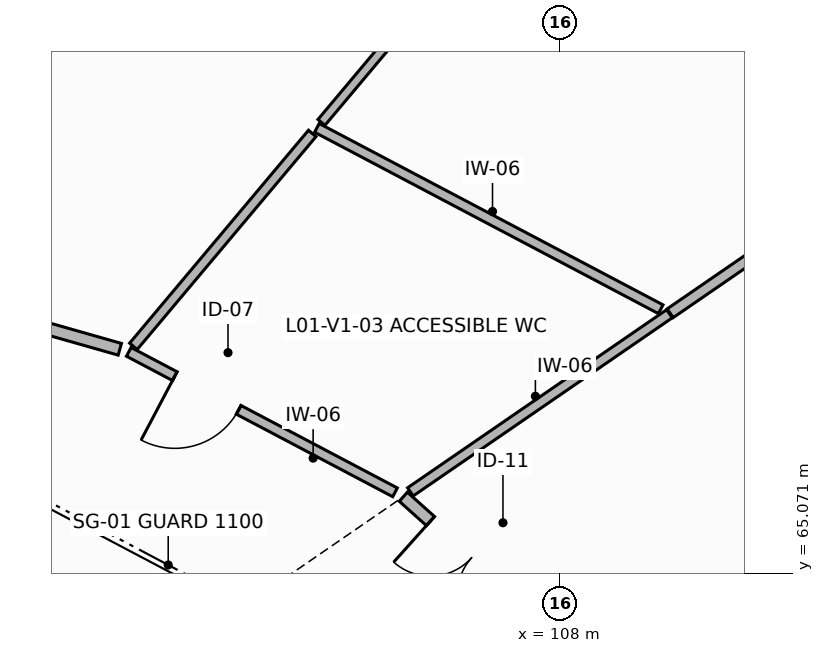
"""IFC4 building model, lengths in metres.
Left out: names, types, materials, properties, quantities, classifications, styles, units other than length and angle.
Written with IfcOpenShell. Run it as: python <this file> out.ifc"""

import sys

from ifc_helpers import new_model, si_unit, direction, frame, frame_2d, origin, place, context, subcontext, project, spatial, rectangle, extrude, element, fill, save


model = new_model("IFC4")
c1 = context("Model", 3, precision=1e-05, world=origin(), true_north=direction((0.0, 1.0)))
c2 = subcontext(c1, "Body", "Model", "MODEL_VIEW")
j1 = project(units=[si_unit("LENGTHUNIT", "METRE"), si_unit("PLANEANGLEUNIT", "RADIAN")], contexts=[c1])
p1 = place(None, origin())
s1 = spatial("IfcSite", under=j1, at=p1, CompositionType="ELEMENT")
p2 = place(p1, origin())
s2 = spatial("IfcBuilding", under=s1, at=p2, CompositionType="ELEMENT")
p3 = place(p2, frame((0.0, 0.0, 4.5)))
s3 = spatial("IfcBuildingStorey", under=s2, at=p3, CompositionType="ELEMENT", Elevation=4.5)
p4 = place(p3, frame((108.803, 63.634, 0.0), z_axis=(0.0, 0.0, 1.0), x_axis=(0.929449560743, 0.368949202513, 0.0)))
e1 = element("IfcWall", 1, at=p4, inside=s3, PredefinedType="PARTITIONING", context=c2, shape_type="SweptSolid", body=[
    extrude(rectangle(XDim=13.11, YDim=0.14, at=frame_2d((6.555, 0.0))), origin(), (0.0, 0.0, 1.0), 2.99),
])
p5 = place(p3, frame((108.604, 63.684, 0.0), z_axis=(0.0, 0.0, 1.0), x_axis=(-0.744831812661, 0.667252254284, 0.0)))
e2 = element("IfcWall", 2, at=p5, inside=s3, PredefinedType="PARTITIONING", context=c2, shape_type="SweptSolid", body=[
    extrude(rectangle(XDim=3.588, YDim=0.16, at=frame_2d((1.794, 0.0))), origin(), (0.0, 0.0, 1.0), 2.99),
])
p6 = place(p5, frame((1.658, 0.0, 0.0)))
e3 = element("IfcOpeningElement", 3, at=p6, cuts=e2, PredefinedType="OPENING", context=c2, shape_type="SweptSolid", body=[
    extrude(rectangle(XDim=1.45, YDim=2.25, at=frame_2d((0.725, 1.125))), frame((0.0, 0.09, 0.0), z_axis=(0.0, -1.0, 0.0), x_axis=(1.0, 0.0, 0.0)), (0.0, 0.0, 1.0), 0.18),
])
p7 = place(p3, frame((106.025, 66.142, 0.0), z_axis=(0.0, 0.0, 1.0), x_axis=(0.82405570279, 0.566508780779, 0.0)))
e4 = element("IfcWall", 4, at=p7, inside=s3, PredefinedType="PARTITIONING", context=c2, shape_type="SweptSolid", body=[
    extrude(rectangle(XDim=4.136, YDim=0.13, at=frame_2d((2.068, 0.0))), origin(), (0.0, 0.0, 1.0), 2.99),
])
p8 = place(p3, frame((109.443, 68.492, 0.0), z_axis=(0.0, 0.0, 1.0), x_axis=(0.82403198394, 0.566543281175, 0.0)))
e5 = element("IfcWall", 5, at=p8, inside=s3, PredefinedType="PARTITIONING", context=c2, shape_type="SweptSolid", body=[
    extrude(rectangle(XDim=7.883, YDim=0.14, at=frame_2d((3.941, 0.0))), origin(), (0.0, 0.0, 1.0), 2.99),
])
p9 = place(p3, frame((104.795, 70.931, 0.0), z_axis=(0.0, 0.0, 1.0), x_axis=(0.884486003867, -0.466566725093, 0.0)))
e6 = element("IfcWall", 6, at=p9, inside=s3, PredefinedType="PARTITIONING", context=c2, shape_type="SweptSolid", body=[
    extrude(rectangle(XDim=5.114, YDim=0.13, at=frame_2d((2.557, 0.0))), origin(), (0.0, 0.0, 1.0), 2.99),
])
p10 = place(p3, frame((105.823, 66.136, 0.0), z_axis=(0.0, 0.0, 1.0), x_axis=(-0.884475212642, 0.466587181802, 0.0)))
e7 = element("IfcWall", 7, at=p10, inside=s3, PredefinedType="PARTITIONING", context=c2, shape_type="SweptSolid", body=[
    extrude(rectangle(XDim=3.96, YDim=0.13, at=frame_2d((1.98, 0.0))), origin(), (0.0, 0.0, 1.0), 2.99),
])
p11 = place(p10, frame((2.326, 0.0, 0.0)))
e8 = element("IfcOpeningElement", 8, at=p11, cuts=e7, PredefinedType="OPENING", context=c2, shape_type="SweptSolid", body=[
    extrude(rectangle(XDim=0.95, YDim=2.1, at=frame_2d((0.475, 1.05))), frame((0.0, 0.075, 0.0), z_axis=(0.0, -1.0, 0.0), x_axis=(1.0, 0.0, 0.0)), (0.0, 0.0, 1.0), 0.15),
])
p12 = place(p3, frame((102.381, 68.057, 0.0), z_axis=(0.0, 0.0, 1.0), x_axis=(0.643179564641, 0.765715382912, 0.0)))
e9 = element("IfcWall", 9, at=p12, inside=s3, PredefinedType="PARTITIONING", context=c2, shape_type="SweptSolid", body=[
    extrude(rectangle(XDim=3.658, YDim=0.13, at=frame_2d((1.829, 0.0))), origin(), (0.0, 0.0, 1.0), 2.99),
])
p13 = place(p3, frame((109.375, 76.385, 0.0), z_axis=(0.0, 0.0, 1.0), x_axis=(-0.643114691403, -0.765769869936, 0.0)))
e10 = element("IfcWall", 10, at=p13, inside=s3, PredefinedType="PARTITIONING", context=c2, shape_type="SweptSolid", body=[
    extrude(rectangle(XDim=7.028, YDim=0.12, at=frame_2d((3.514, 0.0))), origin(), (0.0, 0.0, 1.0), 2.99),
])
p14 = place(p3, frame((102.202, 68.018, 0.0), z_axis=(0.0, 0.0, 1.0), x_axis=(-0.961841952324, 0.27360566286, 0.0)))
e11 = element("IfcWall", 11, at=p14, inside=s3, PredefinedType="PARTITIONING", context=c2, shape_type="SweptSolid", body=[
    extrude(rectangle(XDim=4.25, YDim=0.16, at=frame_2d((2.125, 0.0))), origin(), (0.0, 0.0, 1.0), 2.99),
])
p15 = place(p14, frame((2.013, 0.0, 0.0)))
e12 = element("IfcOpeningElement", 12, at=p15, cuts=e11, PredefinedType="OPENING", context=c2, shape_type="SweptSolid", body=[
    extrude(rectangle(XDim=1.1, YDim=2.2, at=frame_2d((0.55, 1.1))), frame((0.0, 0.09, 0.0), z_axis=(0.0, -1.0, 0.0), x_axis=(1.0, 0.0, 0.0)), (0.0, 0.0, 1.0), 0.18),
])
p16 = place(p3, frame((98.15, 69.274, 0.0), z_axis=(0.0, 0.0, 1.0), x_axis=(0.363124982421, 0.931740439791, 0.0)))
e13 = element("IfcWall", 13, at=p16, inside=s3, PredefinedType="PARTITIONING", context=c2, shape_type="SweptSolid", body=[
    extrude(rectangle(XDim=9.928, YDim=0.12, at=frame_2d((4.964, 0.0))), origin(), (0.0, 0.0, 1.0), 2.99),
])
p17 = place(p6, origin())
e14 = element("IfcDoor", 14, at=p17, inside=s3, OperationType="DOUBLE_DOOR_SINGLE_SWING", PredefinedType="DOOR", context=c2, shape_type="SweptSolid", body=[
    extrude(rectangle(XDim=1.45, YDim=2.25, at=frame_2d((0.725, 1.125))), frame((0.0, 0.025, 0.0), z_axis=(0.0, -1.0, 0.0), x_axis=(1.0, 0.0, 0.0)), (0.0, 0.0, 1.0), 0.05),
])
fill(e3, e14)
p18 = place(p11, origin())
e15 = element("IfcDoor", 15, at=p18, inside=s3, OperationType="SINGLE_SWING_RIGHT", PredefinedType="DOOR", context=c2, shape_type="SweptSolid", body=[
    extrude(rectangle(XDim=0.95, YDim=2.1, at=frame_2d((0.475, 1.05))), frame((0.0, 0.025, 0.0), z_axis=(0.0, -1.0, 0.0), x_axis=(1.0, 0.0, 0.0)), (0.0, 0.0, 1.0), 0.05),
])
fill(e8, e15)
save(model, sys.argv[1])
